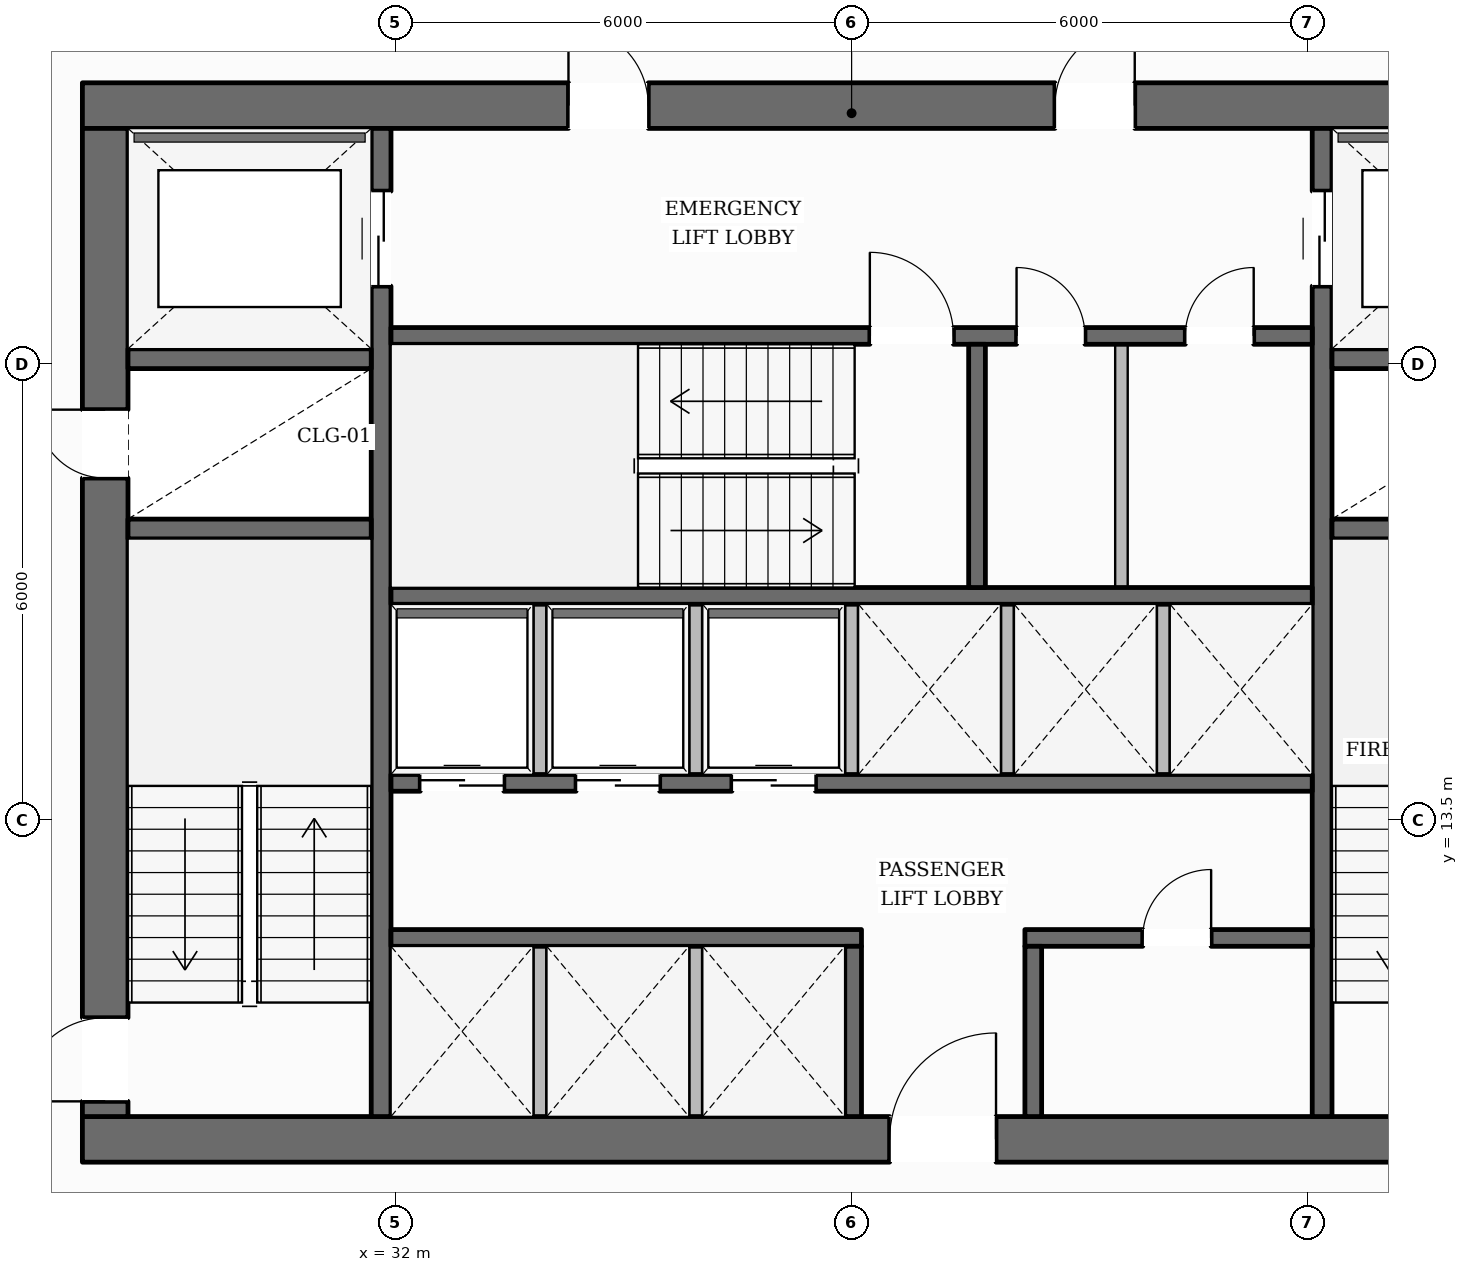
"""IFC4 building model, lengths in metres.
Left out: names, types, materials, properties, quantities, classifications, styles, units other than length and angle.
Written with IfcOpenShell. Run it as: python <this file> out.ifc"""

import sys

from ifc_helpers import new_model, si_unit, direction, frame, frame_2d, origin, place, context, subcontext, project, spatial, rectangle, extrude, element, fill, save


model = new_model("IFC4")
c1 = context("Model", 3, precision=1e-05, world=origin(), true_north=direction((0.0, 1.0)))
c2 = subcontext(c1, "Body", "Model", "MODEL_VIEW")
j1 = project(units=[si_unit("LENGTHUNIT", "METRE"), si_unit("PLANEANGLEUNIT", "RADIAN")], contexts=[c1])
p1 = place(None, origin())
s1 = spatial("IfcSite", under=j1, at=p1, CompositionType="ELEMENT")
p2 = place(p1, origin())
s2 = spatial("IfcBuilding", under=s1, at=p2, CompositionType="ELEMENT")
p3 = place(p2, frame((0.0, 0.0, 13.7)))
s3 = spatial("IfcBuildingStorey", under=s2, at=p3, CompositionType="ELEMENT", Elevation=13.7)
p4 = place(p3, frame((27.88, 9.3, 0.0), z_axis=(0.0, 0.0, 1.0), x_axis=(1.0, 0.0, 0.0)))
e1 = element("IfcWall", 1, at=p4, inside=s3, PredefinedType="SOLIDWALL", context=c2, shape_type="SweptSolid", body=[
    extrude(rectangle(XDim=20.24, YDim=0.6, at=frame_2d((10.12, 0.0))), origin(), (0.0, 0.0, 1.0), 3.59),
])
p5 = place(p4, frame((10.62, 0.0, 0.0)))
e2 = element("IfcOpeningElement", 2, at=p5, cuts=e1, PredefinedType="OPENING", context=c2, shape_type="SweptSolid", body=[
    extrude(rectangle(XDim=1.4, YDim=2.2, at=frame_2d((0.7, 1.1))), frame((0.0, 0.31, 0.0), z_axis=(0.0, -1.0, 0.0), x_axis=(1.0, 0.0, 0.0)), (0.0, 0.0, 1.0), 0.62),
])
p6 = place(p3, frame((27.88, 22.9, 0.0), z_axis=(0.0, 0.0, 1.0), x_axis=(1.0, 0.0, 0.0)))
e3 = element("IfcWall", 3, at=p6, inside=s3, PredefinedType="SOLIDWALL", context=c2, shape_type="SweptSolid", body=[
    extrude(rectangle(XDim=20.24, YDim=0.6, at=frame_2d((10.12, 0.0))), origin(), (0.0, 0.0, 1.0), 3.59),
])
p7 = place(p6, frame((6.395, 0.0, 0.0)))
e4 = element("IfcOpeningElement", 4, at=p7, cuts=e3, PredefinedType="OPENING", context=c2, shape_type="SweptSolid", body=[
    extrude(rectangle(XDim=1.05, YDim=2.15, at=frame_2d((0.525, 1.075))), frame((0.0, 0.31, 0.0), z_axis=(0.0, -1.0, 0.0), x_axis=(1.0, 0.0, 0.0)), (0.0, 0.0, 1.0), 0.62),
])
p8 = place(p6, frame((12.795, 0.0, 0.0)))
e5 = element("IfcOpeningElement", 5, at=p8, cuts=e3, PredefinedType="OPENING", context=c2, shape_type="SweptSolid", body=[
    extrude(rectangle(XDim=1.05, YDim=2.15, at=frame_2d((0.525, 1.075))), frame((0.0, 0.31, 0.0), z_axis=(0.0, -1.0, 0.0), x_axis=(1.0, 0.0, 0.0)), (0.0, 0.0, 1.0), 0.62),
])
p9 = place(p3, frame((28.18, 9.6, 0.0), z_axis=(0.0, 0.0, 1.0), x_axis=(0.0, 1.0, 0.0)))
e6 = element("IfcWall", 6, at=p9, inside=s3, PredefinedType="SOLIDWALL", context=c2, shape_type="SweptSolid", body=[
    extrude(rectangle(XDim=13.0, YDim=0.6, at=frame_2d((6.5, 0.0))), origin(), (0.0, 0.0, 1.0), 3.59),
])
p10 = place(p9, frame((0.2, 0.0, 0.0)))
e7 = element("IfcOpeningElement", 7, at=p10, cuts=e6, PredefinedType="OPENING", context=c2, shape_type="SweptSolid", body=[
    extrude(rectangle(XDim=1.1, YDim=2.15, at=frame_2d((0.55, 1.075))), frame((0.0, 0.31, 0.0), z_axis=(0.0, -1.0, 0.0), x_axis=(1.0, 0.0, 0.0)), (0.0, 0.0, 1.0), 0.62),
])
p11 = place(p9, frame((8.4, 0.0, 0.0)))
e8 = element("IfcOpeningElement", 8, at=p11, cuts=e6, PredefinedType="OPENING", context=c2, shape_type="SweptSolid", body=[
    extrude(rectangle(XDim=0.9, YDim=2.1, at=frame_2d((0.45, 1.05))), frame((0.0, 0.31, 0.0), z_axis=(0.0, -1.0, 0.0), x_axis=(1.0, 0.0, 0.0)), (0.0, 0.0, 1.0), 0.62),
])
p12 = place(p3, frame((31.81, 9.6, 0.0), z_axis=(0.0, 0.0, 1.0), x_axis=(0.0, 1.0, 0.0)))
e9 = element("IfcWall", 9, at=p12, inside=s3, PredefinedType="SHEAR", context=c2, shape_type="SweptSolid", body=[
    extrude(rectangle(XDim=13.0, YDim=0.26, at=frame_2d((6.5, 0.0))), origin(), (0.0, 0.0, 1.0), 3.59),
])
p13 = place(p12, frame((10.925, 0.0, 0.0)))
e10 = element("IfcOpeningElement", 10, at=p13, cuts=e9, PredefinedType="OPENING", context=c2, shape_type="SweptSolid", body=[
    extrude(rectangle(XDim=1.25, YDim=2.25, at=frame_2d((0.625, 1.125))), frame((0.0, 0.14, 0.0), z_axis=(0.0, -1.0, 0.0), x_axis=(1.0, 0.0, 0.0)), (0.0, 0.0, 1.0), 0.28),
])
p14 = place(p3, frame((44.19, 9.6, 0.0), z_axis=(0.0, 0.0, 1.0), x_axis=(0.0, 1.0, 0.0)))
e11 = element("IfcWall", 11, at=p14, inside=s3, PredefinedType="SHEAR", context=c2, shape_type="SweptSolid", body=[
    extrude(rectangle(XDim=13.0, YDim=0.26, at=frame_2d((6.5, 0.0))), origin(), (0.0, 0.0, 1.0), 3.59),
])
p15 = place(p14, frame((10.925, 0.0, 0.0)))
e12 = element("IfcOpeningElement", 12, at=p15, cuts=e11, PredefinedType="OPENING", context=c2, shape_type="SweptSolid", body=[
    extrude(rectangle(XDim=1.25, YDim=2.25, at=frame_2d((0.625, 1.125))), frame((0.0, 0.14, 0.0), z_axis=(0.0, -1.0, 0.0), x_axis=(1.0, 0.0, 0.0)), (0.0, 0.0, 1.0), 0.28),
])
for number, where, z_axis, x_axis in (
    (13, (28.48, 17.33, 0.0), (0.0, 0.0, 1.0), (1.0, 0.0, 0.0)),
    (14, (28.48, 19.57, 0.0), (0.0, 0.0, 1.0), (1.0, 0.0, 0.0)),
    (15, (44.32, 17.33, 0.0), (0.0, 0.0, 1.0), (1.0, 0.0, 0.0)),
    (16, (44.32, 19.57, 0.0), (0.0, 0.0, 1.0), (1.0, 0.0, 0.0)),
):
    element("IfcWall", number, at=place(p3, frame(where, z_axis=z_axis, x_axis=x_axis)), inside=s3, PredefinedType="SHEAR", context=c2, shape_type="SweptSolid", body=[
        extrude(rectangle(XDim=3.2, YDim=0.26, at=frame_2d((1.6, 0.0))), origin(), (0.0, 0.0, 1.0), 3.59),
    ])
p16 = place(p3, frame((31.94, 19.87, 0.0), z_axis=(0.0, 0.0, 1.0), x_axis=(1.0, 0.0, 0.0)))
e17 = element("IfcWall", 17, at=p16, inside=s3, PredefinedType="SOLIDWALL", context=c2, shape_type="SweptSolid", body=[
    extrude(rectangle(XDim=12.12, YDim=0.22, at=frame_2d((6.06, 0.0))), origin(), (0.0, 0.0, 1.0), 3.59),
])
p17 = place(p16, frame((6.3, 0.0, 0.0)))
e18 = element("IfcOpeningElement", 18, at=p17, cuts=e17, PredefinedType="OPENING", context=c2, shape_type="SweptSolid", body=[
    extrude(rectangle(XDim=1.1, YDim=2.15, at=frame_2d((0.55, 1.075))), frame((0.0, 0.12, 0.0), z_axis=(0.0, -1.0, 0.0), x_axis=(1.0, 0.0, 0.0)), (0.0, 0.0, 1.0), 0.24),
])
p18 = place(p16, frame((8.23, 0.0, 0.0)))
e19 = element("IfcOpeningElement", 19, at=p18, cuts=e17, PredefinedType="OPENING", context=c2, shape_type="SweptSolid", body=[
    extrude(rectangle(XDim=0.9, YDim=2.1, at=frame_2d((0.45, 1.05))), frame((0.0, 0.12, 0.0), z_axis=(0.0, -1.0, 0.0), x_axis=(1.0, 0.0, 0.0)), (0.0, 0.0, 1.0), 0.24),
])
p19 = place(p16, frame((10.45, 0.0, 0.0)))
e20 = element("IfcOpeningElement", 20, at=p19, cuts=e17, PredefinedType="OPENING", context=c2, shape_type="SweptSolid", body=[
    extrude(rectangle(XDim=0.9, YDim=2.1, at=frame_2d((0.45, 1.05))), frame((0.0, 0.12, 0.0), z_axis=(0.0, -1.0, 0.0), x_axis=(1.0, 0.0, 0.0)), (0.0, 0.0, 1.0), 0.24),
])
p20 = place(p3, frame((31.94, 16.45, 0.0), z_axis=(0.0, 0.0, 1.0), x_axis=(1.0, 0.0, 0.0)))
e21 = element("IfcWall", 21, at=p20, inside=s3, PredefinedType="SOLIDWALL", context=c2, shape_type="SweptSolid", body=[
    extrude(rectangle(XDim=12.12, YDim=0.22, at=frame_2d((6.06, 0.0))), origin(), (0.0, 0.0, 1.0), 3.59),
])
p21 = place(p3, frame((39.65, 16.56, 0.0), z_axis=(0.0, 0.0, 1.0), x_axis=(0.0, 1.0, 0.0)))
e22 = element("IfcWall", 22, at=p21, inside=s3, PredefinedType="SOLIDWALL", context=c2, shape_type="SweptSolid", body=[
    extrude(rectangle(XDim=3.2, YDim=0.22, at=frame_2d((1.6, 0.0))), origin(), (0.0, 0.0, 1.0), 3.59),
])
p22 = place(p3, frame((31.94, 13.99, 0.0), z_axis=(0.0, 0.0, 1.0), x_axis=(1.0, 0.0, 0.0)))
e23 = element("IfcWall", 23, at=p22, inside=s3, PredefinedType="SOLIDWALL", context=c2, shape_type="SweptSolid", body=[
    extrude(rectangle(XDim=12.12, YDim=0.22, at=frame_2d((6.06, 0.0))), origin(), (0.0, 0.0, 1.0), 3.59),
])
p23 = place(p22, frame((0.385, 0.0, 0.0)))
e24 = element("IfcOpeningElement", 24, at=p23, cuts=e23, PredefinedType="OPENING", context=c2, shape_type="SweptSolid", body=[
    extrude(rectangle(XDim=1.1, YDim=2.2, at=frame_2d((0.55, 1.1))), frame((0.0, 0.12, 0.0), z_axis=(0.0, -1.0, 0.0), x_axis=(1.0, 0.0, 0.0)), (0.0, 0.0, 1.0), 0.24),
])
p24 = place(p22, frame((2.435, 0.0, 0.0)))
e25 = element("IfcOpeningElement", 25, at=p24, cuts=e23, PredefinedType="OPENING", context=c2, shape_type="SweptSolid", body=[
    extrude(rectangle(XDim=1.1, YDim=2.2, at=frame_2d((0.55, 1.1))), frame((0.0, 0.12, 0.0), z_axis=(0.0, -1.0, 0.0), x_axis=(1.0, 0.0, 0.0)), (0.0, 0.0, 1.0), 0.24),
])
p25 = place(p22, frame((4.485, 0.0, 0.0)))
e26 = element("IfcOpeningElement", 26, at=p25, cuts=e23, PredefinedType="OPENING", context=c2, shape_type="SweptSolid", body=[
    extrude(rectangle(XDim=1.1, YDim=2.2, at=frame_2d((0.55, 1.1))), frame((0.0, 0.12, 0.0), z_axis=(0.0, -1.0, 0.0), x_axis=(1.0, 0.0, 0.0)), (0.0, 0.0, 1.0), 0.24),
])
p26 = place(p3, frame((31.94, 11.95, 0.0), z_axis=(0.0, 0.0, 1.0), x_axis=(1.0, 0.0, 0.0)))
e27 = element("IfcWall", 27, at=p26, inside=s3, PredefinedType="SOLIDWALL", context=c2, shape_type="SweptSolid", body=[
    extrude(rectangle(XDim=6.19, YDim=0.22, at=frame_2d((3.095, 0.0))), origin(), (0.0, 0.0, 1.0), 3.59),
])
p27 = place(p3, frame((40.28, 11.95, 0.0), z_axis=(0.0, 0.0, 1.0), x_axis=(1.0, 0.0, 0.0)))
e28 = element("IfcWall", 28, at=p27, inside=s3, PredefinedType="SOLIDWALL", context=c2, shape_type="SweptSolid", body=[
    extrude(rectangle(XDim=3.78, YDim=0.22, at=frame_2d((1.89, 0.0))), origin(), (0.0, 0.0, 1.0), 3.59),
])
p28 = place(p27, frame((1.55, 0.0, 0.0)))
e29 = element("IfcOpeningElement", 29, at=p28, cuts=e28, PredefinedType="OPENING", context=c2, shape_type="SweptSolid", body=[
    extrude(rectangle(XDim=0.9, YDim=2.1, at=frame_2d((0.45, 1.05))), frame((0.0, 0.12, 0.0), z_axis=(0.0, -1.0, 0.0), x_axis=(1.0, 0.0, 0.0)), (0.0, 0.0, 1.0), 0.24),
])
for number, where, z_axis, x_axis in (
    (30, (38.02, 9.6, 0.0), (0.0, 0.0, 1.0), (0.0, 1.0, 0.0)),
    (31, (40.39, 9.6, 0.0), (0.0, 0.0, 1.0), (0.0, 1.0, 0.0)),
):
    element("IfcWall", number, at=place(p3, frame(where, z_axis=z_axis, x_axis=x_axis)), inside=s3, PredefinedType="SOLIDWALL", context=c2, shape_type="SweptSolid", body=[
        extrude(rectangle(XDim=2.24, YDim=0.22, at=frame_2d((1.12, 0.0))), origin(), (0.0, 0.0, 1.0), 3.59),
    ])
p29 = place(p3, frame((13.108, 15.002, 0.0), z_axis=(0.0, 0.0, 1.0), x_axis=(0.498757610738, 0.866741510331, 0.0)))
e32 = element("IfcWall", 32, at=p29, inside=s3, PredefinedType="STANDARD", context=c2, shape_type="SweptSolid", body=[
    extrude(rectangle(XDim=33.716, YDim=0.38, at=frame_2d((16.858, 0.0))), origin(), (0.0, 0.0, 1.0), 2.97),
])
p30 = place(p29, frame((29.684, 0.0, 0.65)))
e33 = element("IfcOpeningElement", 33, at=p30, cuts=e32, PredefinedType="OPENING", context=c2, shape_type="SweptSolid", body=[
    extrude(rectangle(XDim=1.65, YDim=1.75, at=frame_2d((0.825, 0.875))), frame((0.0, 0.2, 0.0), z_axis=(0.0, -1.0, 0.0), x_axis=(1.0, 0.0, 0.0)), (0.0, 0.0, 1.0), 0.4),
])
p31 = place(p29, frame((24.223, 0.0, 0.65)))
e34 = element("IfcOpeningElement", 34, at=p31, cuts=e32, PredefinedType="OPENING", context=c2, shape_type="SweptSolid", body=[
    extrude(rectangle(XDim=1.65, YDim=1.75, at=frame_2d((0.825, 0.875))), frame((0.0, 0.2, 0.0), z_axis=(0.0, -1.0, 0.0), x_axis=(1.0, 0.0, 0.0)), (0.0, 0.0, 1.0), 0.4),
])
p32 = place(p29, frame((13.302, 0.0, 0.65)))
e35 = element("IfcOpeningElement", 35, at=p32, cuts=e32, PredefinedType="OPENING", context=c2, shape_type="SweptSolid", body=[
    extrude(rectangle(XDim=1.65, YDim=1.75, at=frame_2d((0.825, 0.875))), frame((0.0, 0.2, 0.0), z_axis=(0.0, -1.0, 0.0), x_axis=(1.0, 0.0, 0.0)), (0.0, 0.0, 1.0), 0.4),
])
p33 = place(p29, frame((7.841, 0.0, 0.65)))
e36 = element("IfcOpeningElement", 36, at=p33, cuts=e32, PredefinedType="OPENING", context=c2, shape_type="SweptSolid", body=[
    extrude(rectangle(XDim=1.65, YDim=1.75, at=frame_2d((0.825, 0.875))), frame((0.0, 0.2, 0.0), z_axis=(0.0, -1.0, 0.0), x_axis=(1.0, 0.0, 0.0)), (0.0, 0.0, 1.0), 0.4),
])
p34 = place(p29, frame((2.38, 0.0, 0.65)))
e37 = element("IfcOpeningElement", 37, at=p34, cuts=e32, PredefinedType="OPENING", context=c2, shape_type="SweptSolid", body=[
    extrude(rectangle(XDim=1.65, YDim=1.75, at=frame_2d((0.825, 0.875))), frame((0.0, 0.2, 0.0), z_axis=(0.0, -1.0, 0.0), x_axis=(1.0, 0.0, 0.0)), (0.0, 0.0, 1.0), 0.4),
])
for number, where, z_axis, x_axis in (
    (38, (33.9, 9.6, 0.0), (0.0, 0.0, 1.0), (0.0, 1.0, 0.0)),
    (39, (35.95, 9.6, 0.0), (0.0, 0.0, 1.0), (0.0, 1.0, 0.0)),
    (40, (33.9, 14.1, 0.0), (0.0, 0.0, 1.0), (0.0, 1.0, 0.0)),
    (41, (35.95, 14.1, 0.0), (0.0, 0.0, 1.0), (0.0, 1.0, 0.0)),
    (42, (38.0, 14.1, 0.0), (0.0, 0.0, 1.0), (0.0, 1.0, 0.0)),
    (43, (40.05, 14.1, 0.0), (0.0, 0.0, 1.0), (0.0, 1.0, 0.0)),
    (44, (42.1, 14.1, 0.0), (0.0, 0.0, 1.0), (0.0, 1.0, 0.0)),
):
    element("IfcWall", number, at=place(p3, frame(where, z_axis=z_axis, x_axis=x_axis)), inside=s3, PredefinedType="PARTITIONING", context=c2, shape_type="SweptSolid", body=[
        extrude(rectangle(XDim=2.24, YDim=0.165, at=frame_2d((1.12, 0.0))), origin(), (0.0, 0.0, 1.0), 3.59),
    ])
p35 = place(p3, frame((41.55, 16.56, 0.0), z_axis=(0.0, 0.0, 1.0), x_axis=(0.0, 1.0, 0.0)))
e45 = element("IfcWall", 45, at=p35, inside=s3, PredefinedType="PARTITIONING", context=c2, shape_type="SweptSolid", body=[
    extrude(rectangle(XDim=3.2, YDim=0.165, at=frame_2d((1.6, 0.0))), origin(), (0.0, 0.0, 1.0), 3.59),
])
p36 = place(p10, origin())
e46 = element("IfcDoor", 46, at=p36, inside=s3, OperationType="SINGLE_SWING_LEFT", PredefinedType="DOOR", context=c2, shape_type="SweptSolid", body=[
    extrude(rectangle(XDim=1.1, YDim=2.15, at=frame_2d((0.55, 1.075))), frame((0.0, 0.025, 0.0), z_axis=(0.0, -1.0, 0.0), x_axis=(1.0, 0.0, 0.0)), (0.0, 0.0, 1.0), 0.05),
])
fill(e7, e46)
p37 = place(p17, origin())
e47 = element("IfcDoor", 47, at=p37, inside=s3, OperationType="SINGLE_SWING_LEFT", PredefinedType="DOOR", context=c2, shape_type="SweptSolid", body=[
    extrude(rectangle(XDim=1.1, YDim=2.15, at=frame_2d((0.55, 1.075))), frame((0.0, 0.025, 0.0), z_axis=(0.0, -1.0, 0.0), x_axis=(1.0, 0.0, 0.0)), (0.0, 0.0, 1.0), 0.05),
])
fill(e18, e47)
p38 = place(p11, origin())
e48 = element("IfcDoor", 48, at=p38, inside=s3, OperationType="SINGLE_SWING_RIGHT", PredefinedType="DOOR", context=c2, shape_type="SweptSolid", body=[
    extrude(rectangle(XDim=0.9, YDim=2.1, at=frame_2d((0.45, 1.05))), frame((0.0, 0.025, 0.0), z_axis=(0.0, -1.0, 0.0), x_axis=(1.0, 0.0, 0.0)), (0.0, 0.0, 1.0), 0.05),
])
fill(e8, e48)
p39 = place(p7, origin())
e49 = element("IfcDoor", 49, at=p39, inside=s3, OperationType="SINGLE_SWING_LEFT", PredefinedType="DOOR", context=c2, shape_type="SweptSolid", body=[
    extrude(rectangle(XDim=1.05, YDim=2.15, at=frame_2d((0.525, 1.075))), frame((0.0, 0.025, 0.0), z_axis=(0.0, -1.0, 0.0), x_axis=(1.0, 0.0, 0.0)), (0.0, 0.0, 1.0), 0.05),
])
fill(e4, e49)
p40 = place(p8, origin())
e50 = element("IfcDoor", 50, at=p40, inside=s3, OperationType="SINGLE_SWING_RIGHT", PredefinedType="DOOR", context=c2, shape_type="SweptSolid", body=[
    extrude(rectangle(XDim=1.05, YDim=2.15, at=frame_2d((0.525, 1.075))), frame((0.0, 0.025, 0.0), z_axis=(0.0, -1.0, 0.0), x_axis=(1.0, 0.0, 0.0)), (0.0, 0.0, 1.0), 0.05),
])
fill(e5, e50)
p41 = place(p13, origin())
e51 = element("IfcDoor", 51, at=p41, inside=s3, OperationType="DOUBLE_DOOR_SLIDING", PredefinedType="DOOR", context=c2, shape_type="SweptSolid", body=[
    extrude(rectangle(XDim=1.25, YDim=2.25, at=frame_2d((0.625, 1.125))), frame((0.0, 0.025, 0.0), z_axis=(0.0, -1.0, 0.0), x_axis=(1.0, 0.0, 0.0)), (0.0, 0.0, 1.0), 0.05),
])
fill(e10, e51)
p42 = place(p15, origin())
e52 = element("IfcDoor", 52, at=p42, inside=s3, OperationType="DOUBLE_DOOR_SLIDING", PredefinedType="DOOR", context=c2, shape_type="SweptSolid", body=[
    extrude(rectangle(XDim=1.25, YDim=2.25, at=frame_2d((0.625, 1.125))), frame((0.0, 0.025, 0.0), z_axis=(0.0, -1.0, 0.0), x_axis=(1.0, 0.0, 0.0)), (0.0, 0.0, 1.0), 0.05),
])
fill(e12, e52)
p43 = place(p5, origin())
e53 = element("IfcDoor", 53, at=p43, inside=s3, OperationType="SINGLE_SWING_RIGHT", PredefinedType="DOOR", context=c2, shape_type="SweptSolid", body=[
    extrude(rectangle(XDim=1.4, YDim=2.2, at=frame_2d((0.7, 1.1))), frame((0.0, 0.025, 0.0), z_axis=(0.0, -1.0, 0.0), x_axis=(1.0, 0.0, 0.0)), (0.0, 0.0, 1.0), 0.05),
])
fill(e2, e53)
p44 = place(p23, origin())
e54 = element("IfcDoor", 54, at=p44, inside=s3, OperationType="DOUBLE_DOOR_SLIDING", PredefinedType="DOOR", context=c2, shape_type="SweptSolid", body=[
    extrude(rectangle(XDim=1.1, YDim=2.2, at=frame_2d((0.55, 1.1))), frame((0.0, 0.025, 0.0), z_axis=(0.0, -1.0, 0.0), x_axis=(1.0, 0.0, 0.0)), (0.0, 0.0, 1.0), 0.05),
])
fill(e24, e54)
p45 = place(p24, origin())
e55 = element("IfcDoor", 55, at=p45, inside=s3, OperationType="DOUBLE_DOOR_SLIDING", PredefinedType="DOOR", context=c2, shape_type="SweptSolid", body=[
    extrude(rectangle(XDim=1.1, YDim=2.2, at=frame_2d((0.55, 1.1))), frame((0.0, 0.025, 0.0), z_axis=(0.0, -1.0, 0.0), x_axis=(1.0, 0.0, 0.0)), (0.0, 0.0, 1.0), 0.05),
])
fill(e25, e55)
p46 = place(p25, origin())
e56 = element("IfcDoor", 56, at=p46, inside=s3, OperationType="DOUBLE_DOOR_SLIDING", PredefinedType="DOOR", context=c2, shape_type="SweptSolid", body=[
    extrude(rectangle(XDim=1.1, YDim=2.2, at=frame_2d((0.55, 1.1))), frame((0.0, 0.025, 0.0), z_axis=(0.0, -1.0, 0.0), x_axis=(1.0, 0.0, 0.0)), (0.0, 0.0, 1.0), 0.05),
])
fill(e26, e56)
p47 = place(p18, origin())
e57 = element("IfcDoor", 57, at=p47, inside=s3, OperationType="SINGLE_SWING_LEFT", PredefinedType="DOOR", context=c2, shape_type="SweptSolid", body=[
    extrude(rectangle(XDim=0.9, YDim=2.1, at=frame_2d((0.45, 1.05))), frame((0.0, 0.025, 0.0), z_axis=(0.0, -1.0, 0.0), x_axis=(1.0, 0.0, 0.0)), (0.0, 0.0, 1.0), 0.05),
])
fill(e19, e57)
p48 = place(p19, origin())
e58 = element("IfcDoor", 58, at=p48, inside=s3, OperationType="SINGLE_SWING_RIGHT", PredefinedType="DOOR", context=c2, shape_type="SweptSolid", body=[
    extrude(rectangle(XDim=0.9, YDim=2.1, at=frame_2d((0.45, 1.05))), frame((0.0, 0.025, 0.0), z_axis=(0.0, -1.0, 0.0), x_axis=(1.0, 0.0, 0.0)), (0.0, 0.0, 1.0), 0.05),
])
fill(e20, e58)
p49 = place(p28, origin())
e59 = element("IfcDoor", 59, at=p49, inside=s3, OperationType="SINGLE_SWING_RIGHT", PredefinedType="DOOR", context=c2, shape_type="SweptSolid", body=[
    extrude(rectangle(XDim=0.9, YDim=2.1, at=frame_2d((0.45, 1.05))), frame((0.0, 0.025, 0.0), z_axis=(0.0, -1.0, 0.0), x_axis=(1.0, 0.0, 0.0)), (0.0, 0.0, 1.0), 0.05),
])
fill(e29, e59)
save(model, sys.argv[1])
